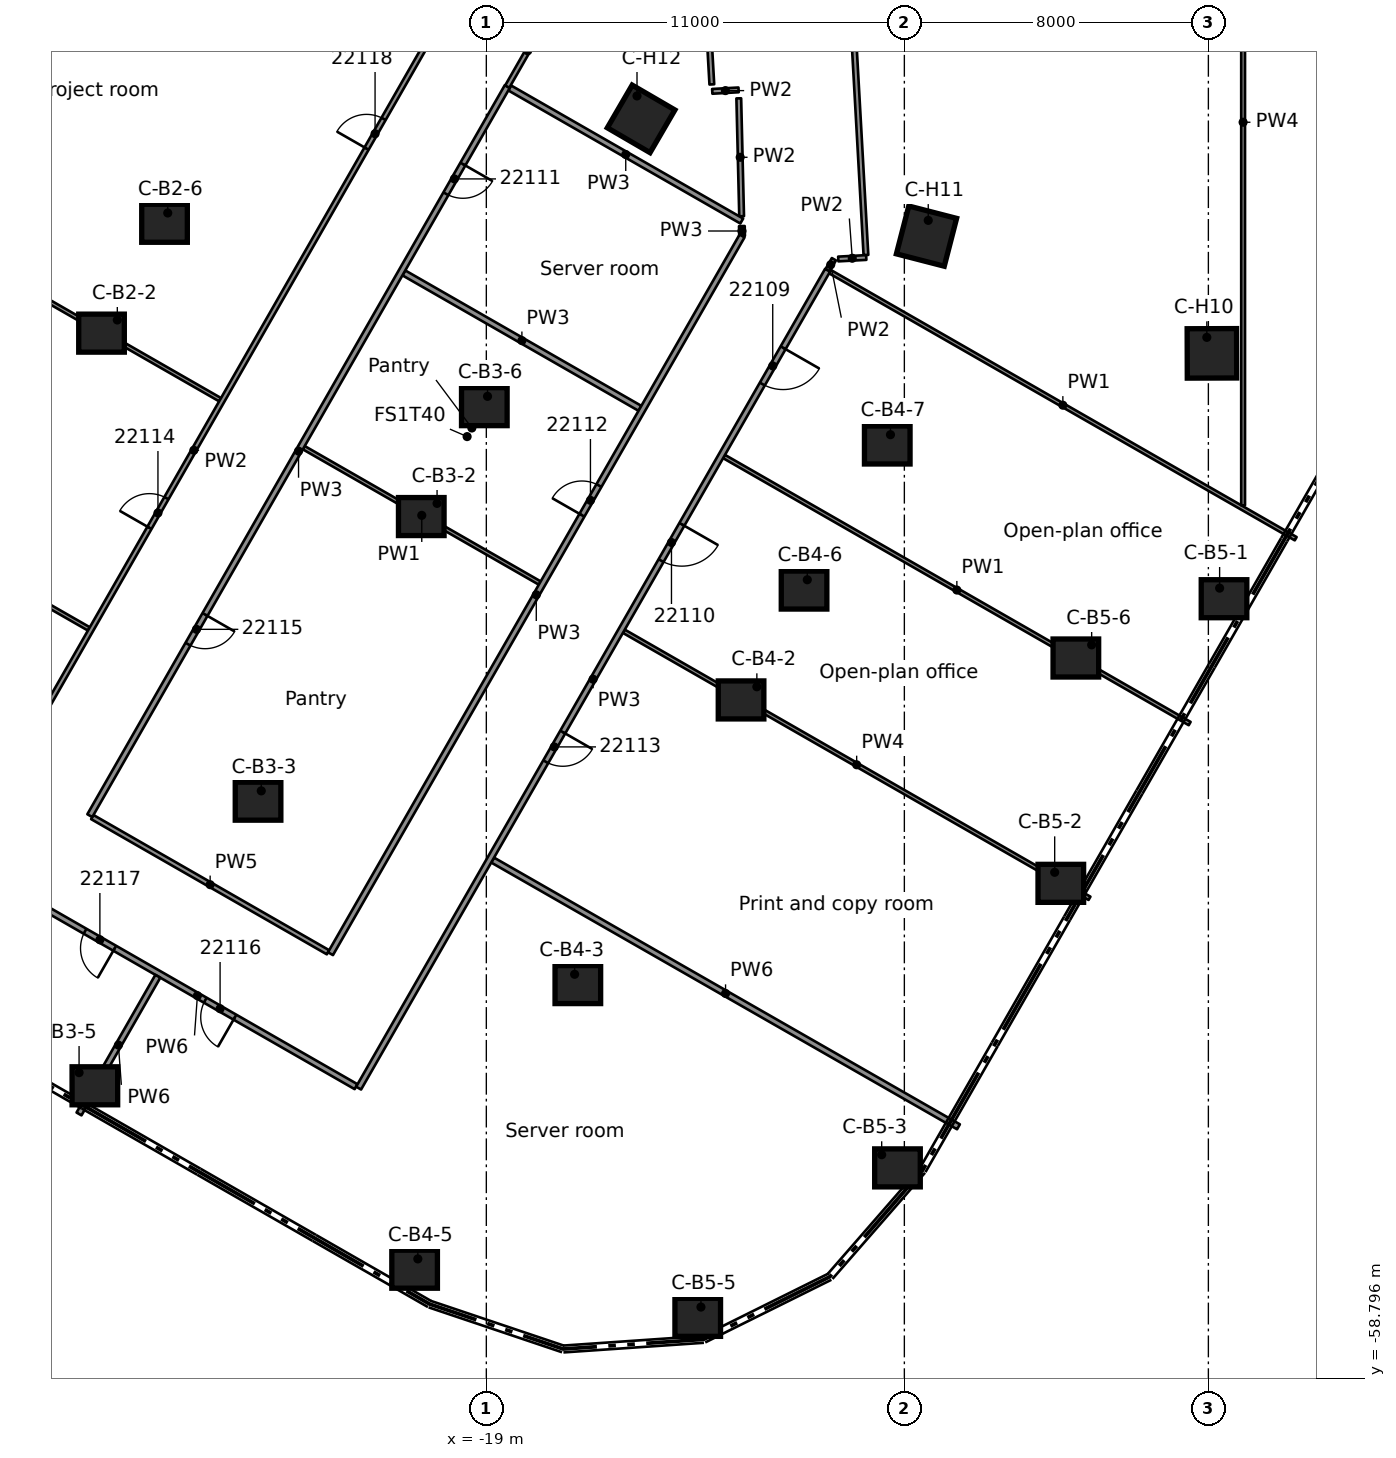
"""IFC4 building model, lengths in metres.
Left out: names, types, materials, properties, quantities, classifications, styles, units other than length and angle.
Written with IfcOpenShell. Run it as: python <this file> out.ifc"""

import sys

from ifc_helpers import new_model, si_unit, direction, frame, frame_2d, origin, origin_2d, place, context, subcontext, project, spatial, rectangle, extrude, element, fill, save


model = new_model("IFC4")
c1 = context("Model", 3, precision=1e-05, world=origin(), true_north=direction((0.0, 1.0)))
c2 = subcontext(c1, "Body", "Model", "MODEL_VIEW")
j1 = project(units=[si_unit("LENGTHUNIT", "METRE"), si_unit("PLANEANGLEUNIT", "RADIAN")], contexts=[c1])
p1 = place(None, origin())
s1 = spatial("IfcSite", under=j1, at=p1, CompositionType="ELEMENT")
p2 = place(p1, origin())
s2 = spatial("IfcBuilding", under=s1, at=p2, CompositionType="ELEMENT")
p3 = place(p2, frame((0.0, 0.0, 116.2)))
s3 = spatial("IfcBuildingStorey", under=s2, at=p3, CompositionType="ELEMENT", Elevation=116.2)
for number, where, z_axis, x_axis in (
    (1, (-29.126, -31.29, 0.0), (0.0, 0.0, 1.0), (1.0, 0.0, 0.0)),
    (2, (-27.468, -28.399, 0.0), (0.0, 0.0, 1.0), (1.0, 0.0, 0.0)),
    (3, (-20.712, -36.116, 0.0), (0.0, 0.0, 1.0), (1.0, 0.0, 0.0)),
    (4, (-25.007, -43.605, 0.0), (0.0, 0.0, 1.0), (1.0, 0.0, 0.0)),
    (5, (-29.301, -51.094, 0.0), (0.0, 0.0, 1.0), (1.0, 0.0, 0.0)),
    (6, (-19.053, -33.224, 0.0), (0.0, 0.0, 1.0), (1.0, 0.0, 0.0)),
    (7, (-12.297, -40.941, 0.0), (0.0, 0.0, 1.0), (1.0, 0.0, 0.0)),
    (8, (-16.592, -48.431, 0.0), (0.0, 0.0, 1.0), (1.0, 0.0, 0.0)),
    (9, (-20.887, -55.92, 0.0), (0.0, 0.0, 1.0), (1.0, 0.0, 0.0)),
    (10, (-10.639, -38.05, 0.0), (0.0, 0.0, 1.0), (1.0, 0.0, 0.0)),
    (11, (-8.45, -34.233, 0.0), (0.0, 0.0, 1.0), (1.0, 0.0, 0.0)),
    (12, (0.412, -38.278, 0.0), (0.0, 0.0, 1.0), (1.0, 0.0, 0.0)),
    (13, (-3.883, -45.767, 0.0), (0.0, 0.0, 1.0), (1.0, 0.0, 0.0)),
    (14, (-8.181, -53.254, 0.0), (0.0, 0.0, 1.0), (1.0, 0.0, 0.0)),
    (15, (-13.437, -57.187, 0.0), (0.0, 0.0, 1.0), (1.0, 0.0, 0.0)),
    (16, (-3.487, -39.838, 0.0), (0.0, 0.0, 1.0), (1.0, 0.0, 0.0)),
):
    element("IfcColumn", number, at=place(p3, frame(where, z_axis=z_axis, x_axis=x_axis)), inside=s3, PredefinedType="COLUMN", context=c2, shape_type="SweptSolid", body=[
        extrude(rectangle(XDim=1.2, YDim=1.0, at=origin_2d()), origin(), (0.0, 0.0, 1.0), 3.5),
    ])
for number, where, z_axis, x_axis in (
    (17, (0.093, -31.822, 0.0), (0.0, 0.0, 1.0), (0.003, -1.0, 0.0)),
    (18, (-7.417, -28.737, 0.0), (0.0, 0.0, 1.0), (-0.25, -0.968, 0.0)),
    (19, (-14.927, -25.652, 0.0), (0.0, 0.0, 1.0), (-0.503, -0.864, 0.0)),
):
    element("IfcColumn", number, at=place(p3, frame(where, z_axis=z_axis, x_axis=x_axis)), inside=s3, PredefinedType="COLUMN", context=c2, shape_type="SweptSolid", body=[
        extrude(rectangle(XDim=1.3, YDim=1.3, at=origin_2d()), origin(), (0.0, 0.0, 1.0), 3.5),
    ])
p4 = place(p3, frame((-12.276, -28.473, 0.0), z_axis=(0.0, 0.0, 1.0), x_axis=(0.022614384817, -0.999744262099, 0.0)))
e20 = element("IfcWall", 20, at=p4, inside=s3, PredefinedType="PARTITIONING", context=c2, shape_type="SweptSolid", body=[
    extrude(rectangle(XDim=0.259, YDim=0.15, at=frame_2d((0.129, 0.0))), origin(), (0.0, 0.0, 1.0), 3.08),
])
p5 = place(p3, frame((-12.357, -25.112, 0.0), z_axis=(0.0, 0.0, 1.0), x_axis=(0.024154763652, -0.999708231132, 0.0)))
e21 = element("IfcWall", 21, at=p5, inside=s3, PredefinedType="PARTITIONING", context=c2, shape_type="SweptSolid", body=[
    extrude(rectangle(XDim=3.103, YDim=0.125, at=frame_2d((1.552, 0.0))), origin(), (0.0, 0.0, 1.0), 3.08),
])
p6 = place(p3, frame((-13.066, -24.745, 0.0), z_axis=(0.0, 0.0, 1.0), x_axis=(-0.056052939146, 0.998427798097, 0.0)))
e22 = element("IfcWall", 22, at=p6, inside=s3, PredefinedType="PARTITIONING", context=c2, shape_type="SweptSolid", body=[
    extrude(rectangle(XDim=9.046, YDim=0.125, at=frame_2d((4.523, 0.0))), origin(), (0.0, 0.0, 1.0), 3.08),
])
p7 = place(p6, frame((2.6, 0.0, 0.0)))
e23 = element("IfcOpeningElement", 23, at=p7, cuts=e22, PredefinedType="OPENING", context=c2, shape_type="SweptSolid", body=[
    extrude(rectangle(XDim=1.0, YDim=2.1, at=frame_2d((0.5, 1.05))), frame((0.0, 0.073, 0.0), z_axis=(0.0, -1.0, 0.0), x_axis=(1.0, 0.0, 0.0)), (0.0, 0.0, 1.0), 0.145),
])
p8 = place(p3, frame((-9.769, -15.662, 0.0), z_axis=(0.0, 0.0, 1.0), x_axis=(0.055763443597, -0.998444008625, 0.0)))
e24 = element("IfcWall", 24, at=p8, inside=s3, PredefinedType="PARTITIONING", context=c2, shape_type="SweptSolid", body=[
    extrude(rectangle(XDim=13.594, YDim=0.125, at=frame_2d((6.797, 0.0))), origin(), (0.0, 0.0, 1.0), 3.08),
])
p9 = place(p3, frame((-22.428, -51.117, 0.0), z_axis=(0.0, 0.0, 1.0), x_axis=(-0.867485037489, 0.497463274758, 0.0)))
e25 = element("IfcWall", 25, at=p9, inside=s3, PredefinedType="PARTITIONING", context=c2, shape_type="SweptSolid", body=[
    extrude(rectangle(XDim=9.625, YDim=0.15, at=frame_2d((4.812, 0.0))), origin(), (0.0, 0.0, 1.0), 2.469),
])
p10 = place(p9, frame((3.675, 0.0, 0.0)))
e26 = element("IfcOpeningElement", 26, at=p10, cuts=e25, PredefinedType="OPENING", context=c2, shape_type="SweptSolid", body=[
    extrude(rectangle(XDim=0.9, YDim=2.1, at=frame_2d((0.45, 1.05))), frame((0.0, 0.085, 0.0), z_axis=(0.0, -1.0, 0.0), x_axis=(1.0, 0.0, 0.0)), (0.0, 0.0, 1.0), 0.17),
])
p11 = place(p9, frame((7.321, 0.0, 0.0)))
e27 = element("IfcOpeningElement", 27, at=p11, cuts=e25, PredefinedType="OPENING", context=c2, shape_type="SweptSolid", body=[
    extrude(rectangle(XDim=0.9, YDim=2.1, at=frame_2d((0.45, 1.05))), frame((0.0, 0.085, 0.0), z_axis=(0.0, -1.0, 0.0), x_axis=(1.0, 0.0, 0.0)), (0.0, 0.0, 1.0), 0.17),
])
p12 = place(p3, frame((-29.369, -44.023, 0.0), z_axis=(0.0, 0.0, 1.0), x_axis=(0.867422571977, -0.49757218735, 0.0)))
e28 = element("IfcWall", 28, at=p12, inside=s3, PredefinedType="PARTITIONING", context=c2, shape_type="SweptSolid", body=[
    extrude(rectangle(XDim=7.151, YDim=0.125, at=frame_2d((3.575, 0.0))), origin(), (0.0, 0.0, 1.0), 2.469),
])
p13 = place(p3, frame((-41.723, -32.05, 0.0), z_axis=(0.0, 0.0, 1.0), x_axis=(0.867815443194, -0.49688666369, 0.0)))
e29 = element("IfcWall", 29, at=p13, inside=s3, PredefinedType="PARTITIONING", context=c2, shape_type="SweptSolid", body=[
    extrude(rectangle(XDim=14.132, YDim=0.1, at=frame_2d((7.066, 0.0))), origin(), (0.0, 0.0, 1.0), 3.08),
])
p14 = place(p3, frame((-18.834, -45.155, 0.0), z_axis=(0.0, 0.0, 1.0), x_axis=(0.867832273934, -0.496857267552, 0.0)))
e30 = element("IfcWall", 30, at=p14, inside=s3, PredefinedType="PARTITIONING", context=c2, shape_type="SweptSolid", body=[
    extrude(rectangle(XDim=14.125, YDim=0.15, at=frame_2d((7.062, 0.0))), origin(), (0.0, 0.0, 1.0), 2.469),
])
p15 = place(p3, frame((-38.261, -26.013, 0.0), z_axis=(0.0, 0.0, 1.0), x_axis=(0.867471065007, -0.49748763942, 0.0)))
e31 = element("IfcWall", 31, at=p15, inside=s3, PredefinedType="PARTITIONING", context=c2, shape_type="SweptSolid", body=[
    extrude(rectangle(XDim=14.127, YDim=0.1, at=frame_2d((7.063, 0.0))), origin(), (0.0, 0.0, 1.0), 3.08),
])
p16 = place(p3, frame((-23.804, -34.304, 0.0), z_axis=(0.0, 0.0, 1.0), x_axis=(0.867490790569, -0.497453242304, 0.0)))
e32 = element("IfcWall", 32, at=p16, inside=s3, PredefinedType="PARTITIONING", context=c2, shape_type="SweptSolid", body=[
    extrude(rectangle(XDim=7.158, YDim=0.1, at=frame_2d((3.579, 0.0))), origin(), (0.0, 0.0, 1.0), 3.08),
])
p17 = place(p3, frame((-15.382, -39.134, 0.0), z_axis=(0.0, 0.0, 1.0), x_axis=(0.867495524847, -0.497444986276, 0.0)))
e33 = element("IfcWall", 33, at=p17, inside=s3, PredefinedType="PARTITIONING", context=c2, shape_type="SweptSolid", body=[
    extrude(rectangle(XDim=14.126, YDim=0.1, at=frame_2d((7.063, 0.0))), origin(), (0.0, 0.0, 1.0), 2.445),
])
p18 = place(p3, frame((-21.17, -29.705, 0.0), z_axis=(0.0, 0.0, 1.0), x_axis=(0.86744058168, -0.497540789539, 0.0)))
e34 = element("IfcWall", 34, at=p18, inside=s3, PredefinedType="PARTITIONING", context=c2, shape_type="SweptSolid", body=[
    extrude(rectangle(XDim=7.161, YDim=0.15, at=frame_2d((3.581, 0.0))), origin(), (0.0, 0.0, 1.0), 3.08),
])
p19 = place(p3, frame((-12.745, -34.536, 0.0), z_axis=(0.0, 0.0, 1.0), x_axis=(0.867470957273, -0.497487827277, 0.0)))
e35 = element("IfcWall", 35, at=p19, inside=s3, PredefinedType="PARTITIONING", context=c2, shape_type="SweptSolid", body=[
    extrude(rectangle(XDim=14.125, YDim=0.1, at=frame_2d((7.062, 0.0))), origin(), (0.0, 0.0, 1.0), 3.08),
])
p20 = place(p3, frame((-18.384, -24.839, 0.0), z_axis=(0.0, 0.0, 1.0), x_axis=(0.867482124602, -0.497468354266, 0.0)))
e36 = element("IfcWall", 36, at=p20, inside=s3, PredefinedType="PARTITIONING", context=c2, shape_type="SweptSolid", body=[
    extrude(rectangle(XDim=7.038, YDim=0.15, at=frame_2d((3.519, 0.0))), origin(), (0.0, 0.0, 1.0), 3.08),
])
p21 = place(p3, frame((-9.956, -29.673, 0.0), z_axis=(0.0, 0.0, 1.0), x_axis=(0.867525357275, -0.497392957816, 0.0)))
e37 = element("IfcWall", 37, at=p21, inside=s3, PredefinedType="PARTITIONING", context=c2, shape_type="SweptSolid", body=[
    extrude(rectangle(XDim=14.125, YDim=0.1, at=frame_2d((7.063, 0.0))), origin(), (0.0, 0.0, 1.0), 3.08),
])
p22 = place(p3, frame((-9.739, -29.339, 0.0), z_axis=(0.0, 0.0, 1.0), x_axis=(0.998594861221, 0.052993425471, 0.0)))
e38 = element("IfcWall", 38, at=p22, inside=s3, PredefinedType="PARTITIONING", context=c2, shape_type="SweptSolid", body=[
    extrude(rectangle(XDim=0.737, YDim=0.125, at=frame_2d((0.369, 0.0))), origin(), (0.0, 0.0, 1.0), 3.08),
])
p23 = place(p3, frame((-13.055, -24.928, 0.0), z_axis=(0.0, 0.0, 1.0), x_axis=(0.998414554179, 0.056288346959, 0.0)))
e39 = element("IfcWall", 39, at=p23, inside=s3, PredefinedType="PARTITIONING", context=c2, shape_type="SweptSolid", body=[
    extrude(rectangle(XDim=0.694, YDim=0.125, at=frame_2d((0.347, 0.0))), origin(), (0.0, 0.0, 1.0), 3.08),
])
p24 = place(p3, frame((-10.021, -29.636, 0.0), z_axis=(0.0, 0.0, 1.0), x_axis=(0.497705353429, 0.867346171473, 0.0)))
e40 = element("IfcWall", 40, at=p24, inside=s3, PredefinedType="PARTITIONING", context=c2, shape_type="SweptSolid", body=[
    extrude(rectangle(XDim=0.335, YDim=0.125, at=frame_2d((0.168, 0.0))), origin(), (0.0, 0.0, 1.0), 3.08),
])
p25 = place(p3, frame((-10.021, -29.636, 0.0), z_axis=(0.0, 0.0, 1.0), x_axis=(-0.49746005822, -0.867486882019, 0.0)))
e41 = element("IfcWall", 41, at=p25, inside=s3, PredefinedType="PARTITIONING", context=c2, shape_type="SweptSolid", body=[
    extrude(rectangle(XDim=24.806, YDim=0.15, at=frame_2d((12.403, 0.0))), origin(), (0.0, 0.0, 1.0), 3.08),
])
p26 = place(p25, frame((2.35, 0.0, 0.0)))
e42 = element("IfcOpeningElement", 42, at=p26, cuts=e41, PredefinedType="OPENING", context=c2, shape_type="SweptSolid", body=[
    extrude(rectangle(XDim=1.1, YDim=2.1, at=frame_2d((0.55, 1.05))), frame((0.0, 0.085, 0.0), z_axis=(0.0, -1.0, 0.0), x_axis=(1.0, 0.0, 0.0)), (0.0, 0.0, 1.0), 0.17),
])
p27 = place(p25, frame((7.706, 0.0, 0.0)))
e43 = element("IfcOpeningElement", 43, at=p27, cuts=e41, PredefinedType="OPENING", context=c2, shape_type="SweptSolid", body=[
    extrude(rectangle(XDim=1.1, YDim=2.1, at=frame_2d((0.55, 1.05))), frame((0.0, 0.085, 0.0), z_axis=(0.0, -1.0, 0.0), x_axis=(1.0, 0.0, 0.0)), (0.0, 0.0, 1.0), 0.17),
])
p28 = place(p25, frame((14.007, 0.0, 0.0)))
e44 = element("IfcOpeningElement", 44, at=p28, cuts=e41, PredefinedType="OPENING", context=c2, shape_type="SweptSolid", body=[
    extrude(rectangle(XDim=0.9, YDim=2.1, at=frame_2d((0.45, 1.05))), frame((0.0, 0.085, 0.0), z_axis=(0.0, -1.0, 0.0), x_axis=(1.0, 0.0, 0.0)), (0.0, 0.0, 1.0), 0.17),
])
p29 = place(p3, frame((-23.101, -47.618, 0.0), z_axis=(0.0, 0.0, 1.0), x_axis=(0.497490898243, 0.86746919609, 0.0)))
e45 = element("IfcWall", 45, at=p29, inside=s3, PredefinedType="PARTITIONING", context=c2, shape_type="SweptSolid", body=[
    extrude(rectangle(XDim=21.771, YDim=0.15, at=frame_2d((10.886, 0.0))), origin(), (0.0, 0.0, 1.0), 3.08),
])
p30 = place(p29, frame((13.3, 0.0, 0.0)))
e46 = element("IfcOpeningElement", 46, at=p30, cuts=e45, PredefinedType="OPENING", context=c2, shape_type="SweptSolid", body=[
    extrude(rectangle(XDim=0.9, YDim=2.1, at=frame_2d((0.45, 1.05))), frame((0.0, 0.085, 0.0), z_axis=(0.0, -1.0, 0.0), x_axis=(1.0, 0.0, 0.0)), (0.0, 0.0, 1.0), 0.17),
])
p31 = place(p3, frame((-29.718, -51.835, 0.0), z_axis=(0.0, 0.0, 1.0), x_axis=(0.496800084917, 0.867865010026, 0.0)))
e47 = element("IfcWall", 47, at=p31, inside=s3, PredefinedType="PARTITIONING", context=c2, shape_type="SweptSolid", body=[
    extrude(rectangle(XDim=4.175, YDim=0.15, at=frame_2d((2.087, 0.0))), origin(), (0.0, 0.0, 1.0), 2.469),
])
p32 = place(p3, frame((-18.449, -24.802, 0.0), z_axis=(0.0, 0.0, 1.0), x_axis=(-0.496915373234, -0.867799004288, 0.0)))
e48 = element("IfcWall", 48, at=p32, inside=s3, PredefinedType="PARTITIONING", context=c2, shape_type="SweptSolid", body=[
    extrude(rectangle(XDim=22.107, YDim=0.15, at=frame_2d((11.053, 0.0))), origin(), (0.0, 0.0, 1.0), 3.08),
])
p33 = place(p32, frame((2.35, 0.0, 0.0)))
e49 = element("IfcOpeningElement", 49, at=p33, cuts=e48, PredefinedType="OPENING", context=c2, shape_type="SweptSolid", body=[
    extrude(rectangle(XDim=0.9, YDim=2.1, at=frame_2d((0.45, 1.05))), frame((0.0, 0.085, 0.0), z_axis=(0.0, -1.0, 0.0), x_axis=(1.0, 0.0, 0.0)), (0.0, 0.0, 1.0), 0.17),
])
p34 = place(p32, frame((16.007, 0.0, 0.0)))
e50 = element("IfcOpeningElement", 50, at=p34, cuts=e48, PredefinedType="OPENING", context=c2, shape_type="SweptSolid", body=[
    extrude(rectangle(XDim=0.9, YDim=2.1, at=frame_2d((0.45, 1.05))), frame((0.0, 0.085, 0.0), z_axis=(0.0, -1.0, 0.0), x_axis=(1.0, 0.0, 0.0)), (0.0, 0.0, 1.0), 0.17),
])
p35 = place(p3, frame((-18.449, -24.802, 0.0), z_axis=(0.0, 0.0, 1.0), x_axis=(0.496635986683, 0.867958925717, 0.0)))
e51 = element("IfcWall", 51, at=p35, inside=s3, PredefinedType="PARTITIONING", context=c2, shape_type="SweptSolid", body=[
    extrude(rectangle(XDim=2.168, YDim=0.125, at=frame_2d((1.084, 0.0))), origin(), (0.0, 0.0, 1.0), 3.08),
])
p36 = place(p3, frame((-32.859, -45.136, 0.0), z_axis=(0.0, 0.0, 1.0), x_axis=(0.49685627334, 0.867832843146, 0.0)))
e52 = element("IfcWall", 52, at=p36, inside=s3, PredefinedType="PARTITIONING", context=c2, shape_type="SweptSolid", body=[
    extrude(rectangle(XDim=24.808, YDim=0.125, at=frame_2d((12.404, 0.0))), origin(), (0.0, 0.0, 1.0), 3.08),
])
p37 = place(p36, frame((10.052, 0.0, 0.0)))
e53 = element("IfcOpeningElement", 53, at=p37, cuts=e52, PredefinedType="OPENING", context=c2, shape_type="SweptSolid", body=[
    extrude(rectangle(XDim=0.9, YDim=2.1, at=frame_2d((0.45, 1.05))), frame((0.0, 0.073, 0.0), z_axis=(0.0, -1.0, 0.0), x_axis=(1.0, 0.0, 0.0)), (0.0, 0.0, 1.0), 0.145),
])
p38 = place(p36, frame((21.551, 0.0, 0.0)))
e54 = element("IfcOpeningElement", 54, at=p38, cuts=e52, PredefinedType="OPENING", context=c2, shape_type="SweptSolid", body=[
    extrude(rectangle(XDim=0.9, YDim=2.1, at=frame_2d((0.45, 1.05))), frame((0.0, 0.073, 0.0), z_axis=(0.0, -1.0, 0.0), x_axis=(1.0, 0.0, 0.0)), (0.0, 0.0, 1.0), 0.145),
])
p39 = place(p3, frame((0.914, -35.82, 0.0), z_axis=(0.0, 0.0, 1.0), x_axis=(0.0, 1.0, 0.0)))
e55 = element("IfcWall", 55, at=p39, inside=s3, PredefinedType="PARTITIONING", context=c2, shape_type="SweptSolid", body=[
    extrude(rectangle(XDim=20.158, YDim=0.1, at=frame_2d((10.079, 0.0))), origin(), (0.0, 0.0, 1.0), 2.445),
])
p40 = place(p26, origin())
e56 = element("IfcDoor", 56, at=p40, inside=s3, OperationType="SINGLE_SWING_LEFT", PredefinedType="DOOR", context=c2, shape_type="SweptSolid", body=[
    extrude(rectangle(XDim=1.1, YDim=2.1, at=frame_2d((0.55, 1.05))), frame((0.0, 0.025, 0.0), z_axis=(0.0, -1.0, 0.0), x_axis=(1.0, 0.0, 0.0)), (0.0, 0.0, 1.0), 0.05),
])
fill(e42, e56)
p41 = place(p27, origin())
e57 = element("IfcDoor", 57, at=p41, inside=s3, OperationType="SINGLE_SWING_LEFT", PredefinedType="DOOR", context=c2, shape_type="SweptSolid", body=[
    extrude(rectangle(XDim=1.1, YDim=2.1, at=frame_2d((0.55, 1.05))), frame((0.0, 0.025, 0.0), z_axis=(0.0, -1.0, 0.0), x_axis=(1.0, 0.0, 0.0)), (0.0, 0.0, 1.0), 0.05),
])
fill(e43, e57)
p42 = place(p33, origin())
e58 = element("IfcDoor", 58, at=p42, inside=s3, OperationType="SINGLE_SWING_LEFT", PredefinedType="DOOR", context=c2, shape_type="SweptSolid", body=[
    extrude(rectangle(XDim=0.9, YDim=2.1, at=frame_2d((0.45, 1.05))), frame((0.0, 0.025, 0.0), z_axis=(0.0, -1.0, 0.0), x_axis=(1.0, 0.0, 0.0)), (0.0, 0.0, 1.0), 0.05),
])
fill(e49, e58)
p43 = place(p30, origin())
e59 = element("IfcDoor", 59, at=p43, inside=s3, OperationType="SINGLE_SWING_RIGHT", PredefinedType="DOOR", context=c2, shape_type="SweptSolid", body=[
    extrude(rectangle(XDim=0.9, YDim=2.1, at=frame_2d((0.45, 1.05))), frame((0.0, 0.025, 0.0), z_axis=(0.0, -1.0, 0.0), x_axis=(1.0, 0.0, 0.0)), (0.0, 0.0, 1.0), 0.05),
])
fill(e46, e59)
p44 = place(p28, origin())
e60 = element("IfcDoor", 60, at=p44, inside=s3, OperationType="SINGLE_SWING_RIGHT", PredefinedType="DOOR", context=c2, shape_type="SweptSolid", body=[
    extrude(rectangle(XDim=0.9, YDim=2.1, at=frame_2d((0.45, 1.05))), frame((0.0, 0.025, 0.0), z_axis=(0.0, -1.0, 0.0), x_axis=(1.0, 0.0, 0.0)), (0.0, 0.0, 1.0), 0.05),
])
fill(e44, e60)
p45 = place(p37, origin())
e61 = element("IfcDoor", 61, at=p45, inside=s3, OperationType="SINGLE_SWING_LEFT", PredefinedType="DOOR", context=c2, shape_type="SweptSolid", body=[
    extrude(rectangle(XDim=0.9, YDim=2.1, at=frame_2d((0.45, 1.05))), frame((0.0, 0.025, 0.0), z_axis=(0.0, -1.0, 0.0), x_axis=(1.0, 0.0, 0.0)), (0.0, 0.0, 1.0), 0.05),
])
fill(e53, e61)
p46 = place(p34, origin())
e62 = element("IfcDoor", 62, at=p46, inside=s3, OperationType="SINGLE_SWING_RIGHT", PredefinedType="DOOR", context=c2, shape_type="SweptSolid", body=[
    extrude(rectangle(XDim=0.9, YDim=2.1, at=frame_2d((0.45, 1.05))), frame((0.0, 0.025, 0.0), z_axis=(0.0, -1.0, 0.0), x_axis=(1.0, 0.0, 0.0)), (0.0, 0.0, 1.0), 0.05),
])
fill(e50, e62)
p47 = place(p10, origin())
e63 = element("IfcDoor", 63, at=p47, inside=s3, OperationType="SINGLE_SWING_LEFT", PredefinedType="DOOR", context=c2, shape_type="SweptSolid", body=[
    extrude(rectangle(XDim=0.9, YDim=2.1, at=frame_2d((0.45, 1.05))), frame((0.0, 0.025, 0.0), z_axis=(0.0, -1.0, 0.0), x_axis=(1.0, 0.0, 0.0)), (0.0, 0.0, 1.0), 0.05),
])
fill(e26, e63)
p48 = place(p11, origin())
e64 = element("IfcDoor", 64, at=p48, inside=s3, OperationType="SINGLE_SWING_RIGHT", PredefinedType="DOOR", context=c2, shape_type="SweptSolid", body=[
    extrude(rectangle(XDim=0.9, YDim=2.1, at=frame_2d((0.45, 1.05))), frame((0.0, 0.025, 0.0), z_axis=(0.0, -1.0, 0.0), x_axis=(1.0, 0.0, 0.0)), (0.0, 0.0, 1.0), 0.05),
])
fill(e27, e64)
p49 = place(p38, origin())
e65 = element("IfcDoor", 65, at=p49, inside=s3, OperationType="SINGLE_SWING_RIGHT", PredefinedType="DOOR", context=c2, shape_type="SweptSolid", body=[
    extrude(rectangle(XDim=0.9, YDim=2.1, at=frame_2d((0.45, 1.05))), frame((0.0, 0.025, 0.0), z_axis=(0.0, -1.0, 0.0), x_axis=(1.0, 0.0, 0.0)), (0.0, 0.0, 1.0), 0.05),
])
fill(e54, e65)
save(model, sys.argv[1])
